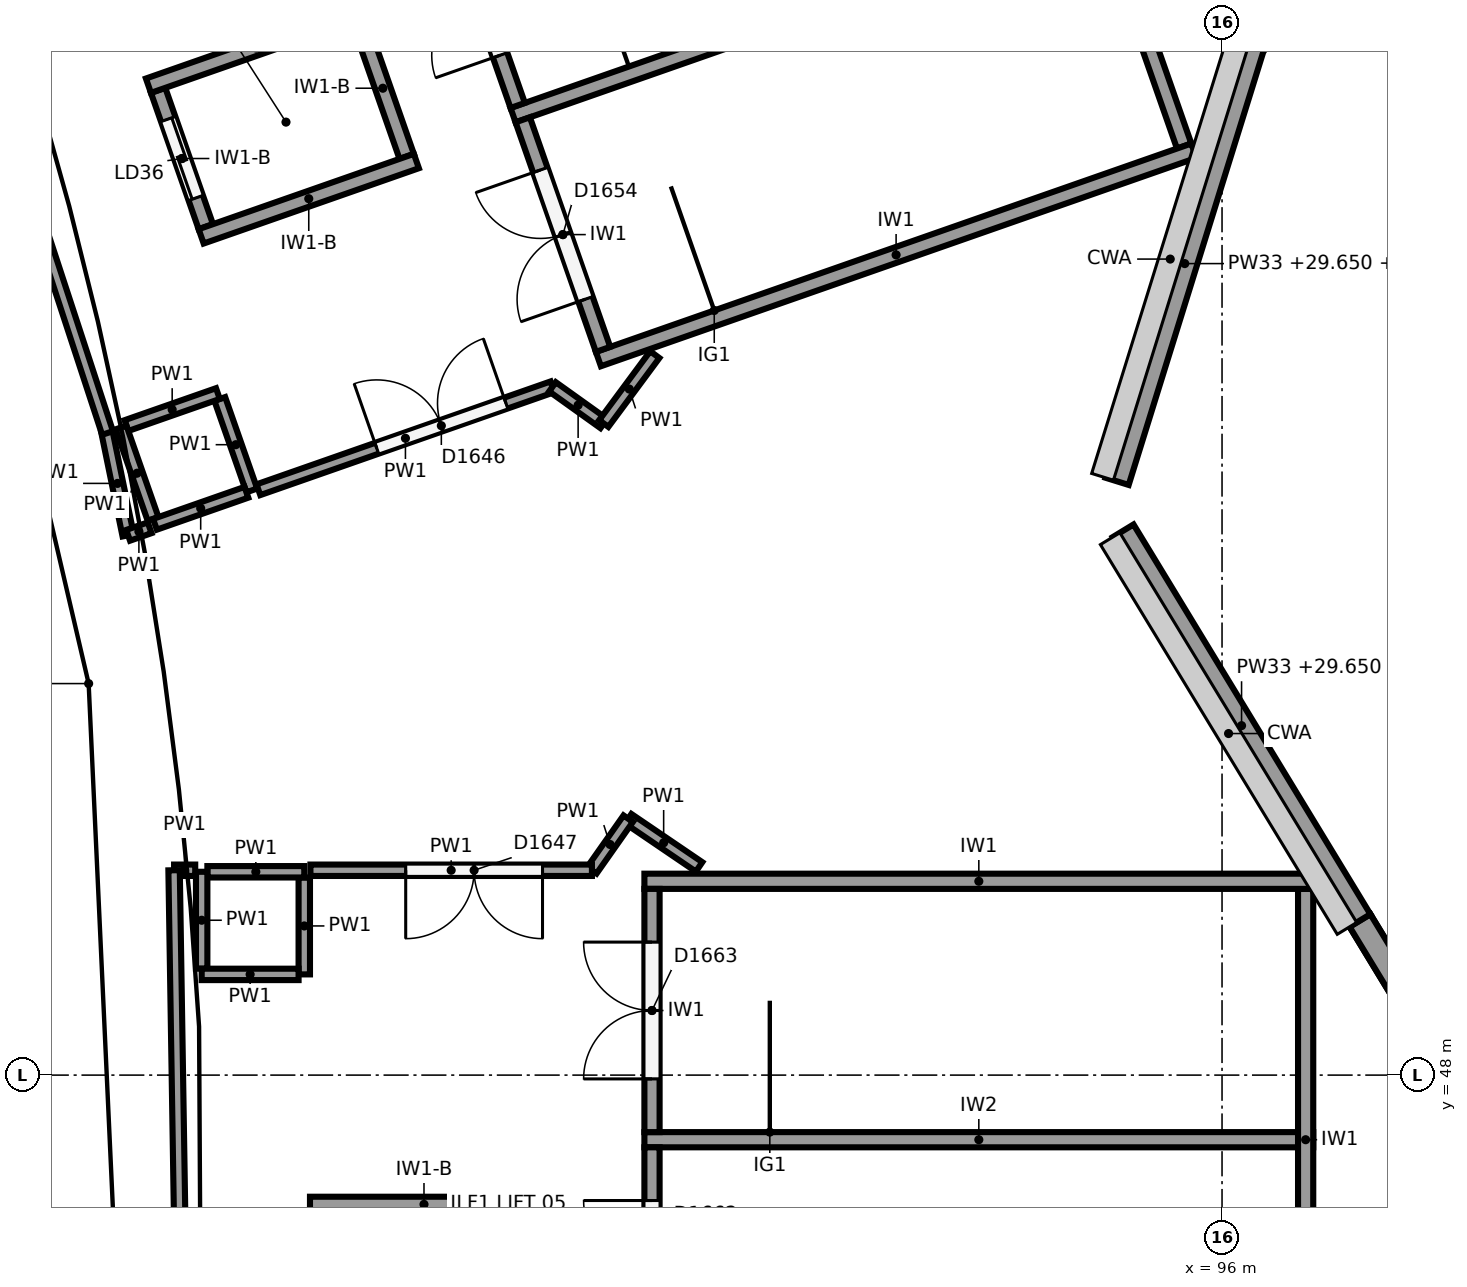
"""IFC4 building model, lengths in metres.
Left out: names, types, materials, properties, quantities, classifications, styles, units other than length and angle.
Written with IfcOpenShell. Run it as: python <this file> out.ifc"""

import sys

from ifc_helpers import new_model, si_unit, direction, frame, frame_2d, origin, origin_2d, place, context, subcontext, project, spatial, polyline, rectangle, circle, outline, extrude, element, fill, save


model = new_model("IFC4")
c1 = context("Model", 3, precision=1e-05, world=origin(), true_north=direction((0.0, 1.0)))
c2 = subcontext(c1, "Body", "Model", "MODEL_VIEW")
j1 = project(units=[si_unit("LENGTHUNIT", "METRE"), si_unit("PLANEANGLEUNIT", "RADIAN")], contexts=[c1])
p1 = place(None, origin())
s1 = spatial("IfcSite", under=j1, at=p1, CompositionType="ELEMENT")
p2 = place(p1, origin())
s2 = spatial("IfcBuilding", under=s1, at=p2, CompositionType="ELEMENT")
p3 = place(p2, frame((0.0, 0.0, 24.0)))
s3 = spatial("IfcBuildingStorey", under=s2, at=p3, CompositionType="ELEMENT", Elevation=24.0)
p4 = place(p3, frame((84.325, 53.802, 0.0), z_axis=(0.0, 0.0, 1.0), x_axis=(1.0, 0.0, 0.0)))
e1 = element("IfcColumn", 1, at=p4, inside=s3, PredefinedType="COLUMN", context=c2, shape_type="SweptSolid", body=[
    extrude(circle(Radius=0.5, at=origin_2d()), origin(), (0.0, 0.0, 1.0), 6.0),
])
p5 = place(p3, frame((94.294, 55.441, 0.0), z_axis=(0.0, 0.0, 1.0), x_axis=(1.0, 0.0, 0.0)))
e2 = element("IfcColumn", 2, at=p5, inside=s3, PredefinedType="COLUMN", context=c2, shape_type="SweptSolid", body=[
    extrude(circle(Radius=0.45, at=origin_2d()), origin(), (0.0, 0.0, 1.0), 6.0),
])
p6 = place(p3, frame((97.815, 50.034, 0.0), z_axis=(0.0, 0.0, 1.0), x_axis=(0.519367009964, -0.854551291007, 0.0)))
e3 = element("IfcWall", 3, at=p6, inside=s3, PredefinedType="SOLIDWALL", context=c2, shape_type="SweptSolid", body=[
    extrude(rectangle(XDim=6.732, YDim=0.32, at=frame_2d((3.366, 0.0))), origin(), (0.0, 0.0, 1.0), 6.0),
])
p7 = place(p6, frame((5.25, 0.0, 1.0)))
e4 = element("IfcOpeningElement", 4, at=p7, cuts=e3, PredefinedType="OPENING", context=c2, shape_type="SweptSolid", body=[
    extrude(rectangle(XDim=0.9, YDim=3.25, at=frame_2d((0.45, 1.625))), frame((0.0, 0.17, 0.0), z_axis=(0.0, -1.0, 0.0), x_axis=(1.0, 0.0, 0.0)), (0.0, 0.0, 1.0), 0.34),
])
p8 = place(p3, frame((97.815, 50.034, 6.0), z_axis=(0.0, 0.0, 1.0), x_axis=(0.519367009964, -0.854551291007, 0.0)))
e5 = element("IfcWall", 5, at=p8, inside=s3, PredefinedType="SOLIDWALL", context=c2, shape_type="SweptSolid", body=[
    extrude(outline(polyline([(0.0, 0.0), (6.732, 0.0), (6.732, 10.442), (0.0, 7.095), (0.0, 0.0)])), frame((0.0, 0.16, 0.0), z_axis=(0.0, -1.0, 0.0), x_axis=(1.0, 0.0, 0.0)), (0.0, 0.0, 1.0), 0.32),
])
p9 = place(p8, frame((5.25, 0.0, 1.6)))
e6 = element("IfcOpeningElement", 6, at=p9, cuts=e5, PredefinedType="OPENING", context=c2, shape_type="SweptSolid", body=[
    extrude(rectangle(XDim=0.9, YDim=3.0, at=frame_2d((0.45, 1.5))), frame((0.0, 0.17, 0.0), z_axis=(0.0, -1.0, 0.0), x_axis=(1.0, 0.0, 0.0)), (0.0, 0.0, 1.0), 0.34),
])
p10 = place(p3, frame((94.699, 55.161, 5.65), z_axis=(0.0, 0.0, 1.0), x_axis=(0.519376262918, -0.85454566731, 0.0)))
e7 = element("IfcWall", 7, at=p10, inside=s3, PredefinedType="SOLIDWALL", context=c2, shape_type="SweptSolid", body=[
    extrude(outline(polyline([(0.0, 0.0), (6.0, 0.0), (6.0, 7.446), (0.0, 4.463), (0.0, 0.0)])), frame((0.0, 0.16, 0.0), z_axis=(0.0, -1.0, 0.0), x_axis=(1.0, 0.0, 0.0)), (0.0, 0.0, 1.0), 0.32),
])
p11 = place(p3, frame((96.4, 61.541, 5.65), z_axis=(0.0, 0.0, 1.0), x_axis=(-0.29687527919, -0.954916262615, 0.0)))
e8 = element("IfcWall", 8, at=p11, inside=s3, PredefinedType="SOLIDWALL", context=c2, shape_type="SweptSolid", body=[
    extrude(outline(polyline([(0.0, 0.0), (6.0, 0.0), (6.0, 4.467), (0.0, 7.498), (0.0, 0.0)])), frame((0.0, 0.16, 0.0), z_axis=(0.0, -1.0, 0.0), x_axis=(1.0, 0.0, 0.0)), (0.0, 0.0, 1.0), 0.32),
])
p12 = place(p3, frame((97.2, 50.55, 0.0), z_axis=(0.0, 0.0, 1.0), x_axis=(-1.0, 0.0, 0.0)))
e9 = element("IfcWall", 9, at=p12, inside=s3, PredefinedType="SHEAR", context=c2, shape_type="SweptSolid", body=[
    extrude(rectangle(XDim=8.8, YDim=0.2, at=frame_2d((4.4, 0.0))), origin(), (0.0, 0.0, 1.0), 5.75),
])
p13 = place(p3, frame((97.1, 43.85, 0.0), z_axis=(0.0, 0.0, 1.0), x_axis=(0.0, 1.0, 0.0)))
e10 = element("IfcWall", 10, at=p13, inside=s3, PredefinedType="SHEAR", context=c2, shape_type="SweptSolid", body=[
    extrude(rectangle(XDim=6.6, YDim=0.2, at=frame_2d((3.3, 0.0))), origin(), (0.0, 0.0, 1.0), 5.75),
])
p14 = place(p3, frame((97.2, 47.15, 0.0), z_axis=(0.0, 0.0, 1.0), x_axis=(-1.0, 0.0, 0.0)))
e11 = element("IfcWall", 11, at=p14, inside=s3, PredefinedType="SHEAR", context=c2, shape_type="SweptSolid", body=[
    extrude(rectangle(XDim=8.8, YDim=0.2, at=frame_2d((4.4, 0.0))), origin(), (0.0, 0.0, 1.0), 5.75),
])
p15 = place(p3, frame((88.5, 43.85, 0.0), z_axis=(0.0, 0.0, 1.0), x_axis=(0.0, 1.0, 0.0)))
e12 = element("IfcWall", 12, at=p15, inside=s3, PredefinedType="SHEAR", context=c2, shape_type="SweptSolid", body=[
    extrude(rectangle(XDim=3.2, YDim=0.2, at=frame_2d((1.6, 0.0))), origin(), (0.0, 0.0, 1.0), 5.75),
])
p16 = place(p15, frame((0.7, 0.0, 0.0)))
e13 = element("IfcOpeningElement", 13, at=p16, cuts=e12, PredefinedType="OPENING", context=c2, shape_type="SweptSolid", body=[
    extrude(rectangle(XDim=1.8, YDim=2.1, at=frame_2d((0.9, 1.05))), frame((0.0, 0.11, 0.0), z_axis=(0.0, -1.0, 0.0), x_axis=(1.0, 0.0, 0.0)), (0.0, 0.0, 1.0), 0.22),
])
p17 = place(p3, frame((88.5, 47.25, 0.0), z_axis=(0.0, 0.0, 1.0), x_axis=(0.0, 1.0, 0.0)))
e14 = element("IfcWall", 14, at=p17, inside=s3, PredefinedType="SHEAR", context=c2, shape_type="SweptSolid", body=[
    extrude(rectangle(XDim=3.2, YDim=0.2, at=frame_2d((1.6, 0.0))), origin(), (0.0, 0.0, 1.0), 5.75),
])
p18 = place(p17, frame((0.7, 0.0, 0.0)))
e15 = element("IfcOpeningElement", 15, at=p18, cuts=e14, PredefinedType="OPENING", context=c2, shape_type="SweptSolid", body=[
    extrude(rectangle(XDim=1.8, YDim=2.1, at=frame_2d((0.9, 1.05))), frame((0.0, 0.11, 0.0), z_axis=(0.0, -1.0, 0.0), x_axis=(1.0, 0.0, 0.0)), (0.0, 0.0, 1.0), 0.22),
])
p19 = place(p3, frame((87.0, 46.3, 0.0), z_axis=(0.0, 0.0, 1.0), x_axis=(-1.0, 0.0, 0.0)))
e16 = element("IfcWall", 16, at=p19, inside=s3, PredefinedType="SHEAR", context=c2, shape_type="SweptSolid", body=[
    extrude(rectangle(XDim=3.0, YDim=0.2, at=frame_2d((1.5, 0.0))), origin(), (0.0, 0.0, 1.0), 4.6),
])
p20 = place(p3, frame((95.629, 60.162, 0.0), z_axis=(0.0, 0.0, 1.0), x_axis=(-0.943887243331, -0.330267878966, 0.0)))
e17 = element("IfcWall", 17, at=p20, inside=s3, PredefinedType="SHEAR", context=c2, shape_type="SweptSolid", body=[
    extrude(rectangle(XDim=8.3, YDim=0.2, at=frame_2d((4.15, 0.0))), origin(), (0.0, 0.0, 1.0), 5.75),
])
p21 = place(p3, frame((95.501, 60.223, 0.0), z_axis=(0.0, 0.0, 1.0), x_axis=(-0.330286164688, 0.943880844925, 0.0)))
e18 = element("IfcWall", 18, at=p21, inside=s3, PredefinedType="SHEAR", context=c2, shape_type="SweptSolid", body=[
    extrude(rectangle(XDim=6.6, YDim=0.2, at=frame_2d((3.3, 0.0))), origin(), (0.0, 0.0, 1.0), 5.75),
])
p22 = place(p3, frame((94.506, 63.371, 0.0), z_axis=(0.0, 0.0, 1.0), x_axis=(-0.943878073457, -0.330294084791, 0.0)))
e19 = element("IfcWall", 19, at=p22, inside=s3, PredefinedType="SHEAR", context=c2, shape_type="SweptSolid", body=[
    extrude(rectangle(XDim=8.3, YDim=0.2, at=frame_2d((4.15, 0.0))), origin(), (0.0, 0.0, 1.0), 5.75),
])
p23 = place(p3, frame((87.856, 57.548, 0.0), z_axis=(0.0, 0.0, 1.0), x_axis=(-0.330268863922, 0.943886898693, 0.0)))
e20 = element("IfcWall", 20, at=p23, inside=s3, PredefinedType="SHEAR", context=c2, shape_type="SweptSolid", body=[
    extrude(rectangle(XDim=3.2, YDim=0.2, at=frame_2d((1.6, 0.0))), origin(), (0.0, 0.0, 1.0), 5.75),
])
p24 = place(p23, frame((0.7, 0.0, 0.0)))
e21 = element("IfcOpeningElement", 21, at=p24, cuts=e20, PredefinedType="OPENING", context=c2, shape_type="SweptSolid", body=[
    extrude(rectangle(XDim=1.8, YDim=2.1, at=frame_2d((0.9, 1.05))), frame((0.0, 0.11, 0.0), z_axis=(0.0, -1.0, 0.0), x_axis=(1.0, 0.0, 0.0)), (0.0, 0.0, 1.0), 0.22),
])
p25 = place(p3, frame((86.733, 60.757, 0.0), z_axis=(0.0, 0.0, 1.0), x_axis=(-0.330268863922, 0.943886898693, 0.0)))
e22 = element("IfcWall", 22, at=p25, inside=s3, PredefinedType="SHEAR", context=c2, shape_type="SweptSolid", body=[
    extrude(rectangle(XDim=3.2, YDim=0.2, at=frame_2d((1.6, 0.0))), origin(), (0.0, 0.0, 1.0), 5.75),
])
p26 = place(p25, frame((0.7, 0.0, 0.0)))
e23 = element("IfcOpeningElement", 23, at=p26, cuts=e22, PredefinedType="OPENING", context=c2, shape_type="SweptSolid", body=[
    extrude(rectangle(XDim=1.8, YDim=2.1, at=frame_2d((0.9, 1.05))), frame((0.0, 0.11, 0.0), z_axis=(0.0, -1.0, 0.0), x_axis=(1.0, 0.0, 0.0)), (0.0, 0.0, 1.0), 0.22),
])
p27 = place(p3, frame((85.4, 60.025, 0.0), z_axis=(0.0, 0.0, 1.0), x_axis=(-0.943900215722, -0.330230802259, 0.0)))
e24 = element("IfcWall", 24, at=p27, inside=s3, PredefinedType="SHEAR", context=c2, shape_type="SweptSolid", body=[
    extrude(rectangle(XDim=3.0, YDim=0.2, at=frame_2d((1.5, 0.0))), origin(), (0.0, 0.0, 1.0), 4.6),
])
p28 = place(p3, frame((84.706, 62.008, 0.0), z_axis=(0.0, 0.0, 1.0), x_axis=(-0.943874847782, -0.330303302625, 0.0)))
e25 = element("IfcWall", 25, at=p28, inside=s3, PredefinedType="SHEAR", context=c2, shape_type="SweptSolid", body=[
    extrude(rectangle(XDim=3.0, YDim=0.2, at=frame_2d((1.5, 0.0))), origin(), (0.0, 0.0, 1.0), 4.6),
])
p29 = place(p3, frame((85.272, 60.087, 0.0), z_axis=(0.0, 0.0, 1.0), x_axis=(-0.330224505327, 0.943902418729, 0.0)))
e26 = element("IfcWall", 26, at=p29, inside=s3, PredefinedType="SHEAR", context=c2, shape_type="SweptSolid", body=[
    extrude(rectangle(XDim=1.9, YDim=0.2, at=frame_2d((0.95, 0.0))), origin(), (0.0, 0.0, 1.0), 4.6),
])
p30 = place(p3, frame((82.629, 59.162, 0.0), z_axis=(0.0, 0.0, 1.0), x_axis=(-0.330224505327, 0.943902418729, 0.0)))
e27 = element("IfcWall", 27, at=p30, inside=s3, PredefinedType="SHEAR", context=c2, shape_type="SweptSolid", body=[
    extrude(rectangle(XDim=1.9, YDim=0.2, at=frame_2d((0.95, 0.0))), origin(), (0.0, 0.0, 1.0), 4.6),
])
p31 = place(p30, frame((0.4, 0.0, 0.0)))
e28 = element("IfcOpeningElement", 28, at=p31, cuts=e27, PredefinedType="OPENING", context=c2, shape_type="SweptSolid", body=[
    extrude(rectangle(XDim=1.1, YDim=2.1, at=frame_2d((0.55, 1.05))), frame((0.0, 0.11, 0.0), z_axis=(0.0, -1.0, 0.0), x_axis=(1.0, 0.0, 0.0)), (0.0, 0.0, 1.0), 0.22),
])
for number, where, z_axis, x_axis in (
    (29, (83.925, 49.325, 0.0), (0.0, 0.0, 1.0), (0.0, 1.0, 0.0)),
    (30, (83.925, 50.675, 0.0), (0.0, 0.0, 1.0), (-1.0, 0.0, 0.0)),
    (31, (82.575, 50.675, 0.0), (0.0, 0.0, 1.0), (0.0, -1.0, 0.0)),
    (32, (82.575, 49.325, 0.0), (0.0, 0.0, 1.0), (1.0, 0.0, 0.0)),
):
    element("IfcWall", number, at=place(p3, frame(where, z_axis=z_axis, x_axis=x_axis)), inside=s3, PredefinedType="PARTITIONING", context=c2, shape_type="SweptSolid", body=[
        extrude(rectangle(XDim=1.275, YDim=0.15, at=frame_2d((0.638, 0.0))), origin(), (0.0, 0.0, 1.0), 5.4),
    ])
p32 = place(p3, frame((89.12, 50.74, 0.0), z_axis=(0.0, 0.0, 1.0), x_axis=(-0.827055308354, 0.562120553728, 0.0)))
e33 = element("IfcWall", 33, at=p32, inside=s3, PredefinedType="PARTITIONING", context=c2, shape_type="SweptSolid", body=[
    extrude(rectangle(XDim=1.128, YDim=0.15, at=frame_2d((0.564, 0.0))), origin(), (0.0, 0.0, 1.0), 5.4),
])
p33 = place(p3, frame((88.187, 51.374, 0.0), z_axis=(0.0, 0.0, 1.0), x_axis=(-0.575376756214, -0.817888493872, 0.0)))
e34 = element("IfcWall", 34, at=p33, inside=s3, PredefinedType="PARTITIONING", context=c2, shape_type="SweptSolid", body=[
    extrude(rectangle(XDim=0.83, YDim=0.15, at=frame_2d((0.415, 0.0))), origin(), (0.0, 0.0, 1.0), 5.4),
])
p34 = place(p3, frame((87.709, 50.695, 0.0), z_axis=(0.0, 0.0, 1.0), x_axis=(-1.0, 0.0, 0.0)))
e35 = element("IfcWall", 35, at=p34, inside=s3, PredefinedType="PARTITIONING", context=c2, shape_type="SweptSolid", body=[
    extrude(rectangle(XDim=3.704, YDim=0.15, at=frame_2d((1.852, 0.0))), origin(), (0.0, 0.0, 1.0), 5.4),
])
p35 = place(p34, frame((0.65, 0.0, 0.0)))
e36 = element("IfcOpeningElement", 36, at=p35, cuts=e35, PredefinedType="OPENING", context=c2, shape_type="SweptSolid", body=[
    extrude(rectangle(XDim=1.8, YDim=2.1, at=frame_2d((0.9, 1.05))), frame((0.0, 0.085, 0.0), z_axis=(0.0, -1.0, 0.0), x_axis=(1.0, 0.0, 0.0)), (0.0, 0.0, 1.0), 0.17),
])
p36 = place(p3, frame((82.49, 50.695, 0.0), z_axis=(0.0, 0.0, 1.0), x_axis=(-1.0, 0.0, 0.0)))
e37 = element("IfcWall", 37, at=p36, inside=s3, PredefinedType="PARTITIONING", context=c2, shape_type="SweptSolid", body=[
    extrude(rectangle(XDim=0.278, YDim=0.15, at=frame_2d((0.139, 0.0))), origin(), (0.0, 0.0, 1.0), 5.4),
])
p37 = place(p3, frame((82.212, 50.695, 0.0), z_axis=(0.0, 0.0, 1.0), x_axis=(0.01602775075, -0.999871547353, 0.0)))
e38 = element("IfcWall", 38, at=p37, inside=s3, PredefinedType="PARTITIONING", context=c2, shape_type="SweptSolid", body=[
    extrude(rectangle(XDim=13.892, YDim=0.15, at=frame_2d((6.946, 0.0))), origin(), (0.0, 0.0, 1.0), 5.4),
])
for number, where, z_axis, x_axis in (
    (39, (83.235, 55.692, 0.0), (0.0, 0.0, 1.0), (-0.33, 0.944, 0.0)),
    (40, (82.789, 56.966, 0.0), (0.0, 0.0, 1.0), (-0.944, -0.33, 0.0)),
    (41, (81.514, 56.521, 0.0), (0.0, 0.0, 1.0), (0.33, -0.944, 0.0)),
):
    element("IfcWall", number, at=place(p3, frame(where, z_axis=z_axis, x_axis=x_axis)), inside=s3, PredefinedType="PARTITIONING", context=c2, shape_type="SweptSolid", body=[
        extrude(rectangle(XDim=1.275, YDim=0.15, at=frame_2d((0.637, 0.0))), origin(), (0.0, 0.0, 1.0), 5.4),
    ])
p38 = place(p3, frame((81.96, 55.246, 0.0), z_axis=(0.0, 0.0, 1.0), x_axis=(0.943888201207, 0.330265141396, 0.0)))
e42 = element("IfcWall", 42, at=p38, inside=s3, PredefinedType="PARTITIONING", context=c2, shape_type="SweptSolid", body=[
    extrude(rectangle(XDim=1.275, YDim=0.15, at=frame_2d((0.638, 0.0))), origin(), (0.0, 0.0, 1.0), 5.4),
])
p39 = place(p3, frame((81.327, 56.468, 0.0), z_axis=(0.0, 0.0, 1.0), x_axis=(0.200862273188, -0.979619491032, 0.0)))
e43 = element("IfcWall", 43, at=p39, inside=s3, PredefinedType="PARTITIONING", context=c2, shape_type="SweptSolid", body=[
    extrude(rectangle(XDim=1.394, YDim=0.15, at=frame_2d((0.697, 0.0))), origin(), (0.0, 0.0, 1.0), 5.4),
])
p40 = place(p3, frame((81.607, 55.102, 0.0), z_axis=(0.0, 0.0, 1.0), x_axis=(0.944111851886, 0.329625258633, 0.0)))
e44 = element("IfcWall", 44, at=p40, inside=s3, PredefinedType="PARTITIONING", context=c2, shape_type="SweptSolid", body=[
    extrude(rectangle(XDim=0.3, YDim=0.15, at=frame_2d((0.15, 0.0))), origin(), (0.0, 0.0, 1.0), 5.4),
])
p41 = place(p3, frame((83.321, 55.701, 0.0), z_axis=(0.0, 0.0, 1.0), x_axis=(0.943873211719, 0.330307977801, 0.0)))
e45 = element("IfcWall", 45, at=p41, inside=s3, PredefinedType="PARTITIONING", context=c2, shape_type="SweptSolid", body=[
    extrude(rectangle(XDim=4.099, YDim=0.15, at=frame_2d((2.05, 0.0))), origin(), (0.0, 0.0, 1.0), 5.4),
])
p42 = place(p41, frame((1.65, 0.0, 0.0)))
e46 = element("IfcOpeningElement", 46, at=p42, cuts=e45, PredefinedType="OPENING", context=c2, shape_type="SweptSolid", body=[
    extrude(rectangle(XDim=1.8, YDim=2.1, at=frame_2d((0.9, 1.05))), frame((0.0, 0.085, 0.0), z_axis=(0.0, -1.0, 0.0), x_axis=(1.0, 0.0, 0.0)), (0.0, 0.0, 1.0), 0.17),
])
p43 = place(p3, frame((87.19, 57.055, 0.0), z_axis=(0.0, 0.0, 1.0), x_axis=(0.813315890962, -0.581822362504, 0.0)))
e47 = element("IfcWall", 47, at=p43, inside=s3, PredefinedType="PARTITIONING", context=c2, shape_type="SweptSolid", body=[
    extrude(rectangle(XDim=0.83, YDim=0.15, at=frame_2d((0.415, 0.0))), origin(), (0.0, 0.0, 1.0), 5.4),
])
p44 = place(p3, frame((87.865, 56.573, 0.0), z_axis=(0.0, 0.0, 1.0), x_axis=(0.595036002288, 0.803699045651, 0.0)))
e48 = element("IfcWall", 48, at=p44, inside=s3, PredefinedType="PARTITIONING", context=c2, shape_type="SweptSolid", body=[
    extrude(rectangle(XDim=1.128, YDim=0.15, at=frame_2d((0.564, 0.0))), origin(), (0.0, 0.0, 1.0), 5.4),
])
p45 = place(p3, frame((77.435, 68.357, 0.0), z_axis=(0.0, 0.0, 1.0), x_axis=(0.311320262687, -0.950305053149, 0.0)))
e49 = element("IfcWall", 49, at=p45, inside=s3, PredefinedType="PARTITIONING", context=c2, shape_type="SweptSolid", body=[
    extrude(rectangle(XDim=12.532, YDim=0.15, at=frame_2d((6.266, 0.0))), origin(), (0.0, 0.0, 1.0), 5.4),
])
p46 = place(p16, origin())
e50 = element("IfcDoor", 50, at=p46, inside=s3, OperationType="DOUBLE_DOOR_SINGLE_SWING", PredefinedType="DOOR", context=c2, shape_type="SweptSolid", body=[
    extrude(rectangle(XDim=1.8, YDim=2.1, at=frame_2d((0.9, 1.05))), frame((0.0, 0.025, 0.0), z_axis=(0.0, -1.0, 0.0), x_axis=(1.0, 0.0, 0.0)), (0.0, 0.0, 1.0), 0.05),
])
fill(e13, e50)
p47 = place(p18, origin())
e51 = element("IfcDoor", 51, at=p47, inside=s3, OperationType="DOUBLE_DOOR_SINGLE_SWING", PredefinedType="DOOR", context=c2, shape_type="SweptSolid", body=[
    extrude(rectangle(XDim=1.8, YDim=2.1, at=frame_2d((0.9, 1.05))), frame((0.0, 0.025, 0.0), z_axis=(0.0, -1.0, 0.0), x_axis=(1.0, 0.0, 0.0)), (0.0, 0.0, 1.0), 0.05),
])
fill(e15, e51)
p48 = place(p24, origin())
e52 = element("IfcDoor", 52, at=p48, inside=s3, OperationType="DOUBLE_DOOR_SINGLE_SWING", PredefinedType="DOOR", context=c2, shape_type="SweptSolid", body=[
    extrude(rectangle(XDim=1.8, YDim=2.1, at=frame_2d((0.9, 1.05))), frame((0.0, 0.025, 0.0), z_axis=(0.0, -1.0, 0.0), x_axis=(1.0, 0.0, 0.0)), (0.0, 0.0, 1.0), 0.05),
])
fill(e21, e52)
p49 = place(p26, origin())
e53 = element("IfcDoor", 53, at=p49, inside=s3, OperationType="DOUBLE_DOOR_SINGLE_SWING", PredefinedType="DOOR", context=c2, shape_type="SweptSolid", body=[
    extrude(rectangle(XDim=1.8, YDim=2.1, at=frame_2d((0.9, 1.05))), frame((0.0, 0.025, 0.0), z_axis=(0.0, -1.0, 0.0), x_axis=(1.0, 0.0, 0.0)), (0.0, 0.0, 1.0), 0.05),
])
fill(e23, e53)
p50 = place(p31, origin())
e54 = element("IfcDoor", 54, at=p50, inside=s3, OperationType="SLIDING_TO_RIGHT", PredefinedType="DOOR", context=c2, shape_type="SweptSolid", body=[
    extrude(rectangle(XDim=1.1, YDim=2.1, at=frame_2d((0.55, 1.05))), frame((0.0, 0.025, 0.0), z_axis=(0.0, -1.0, 0.0), x_axis=(1.0, 0.0, 0.0)), (0.0, 0.0, 1.0), 0.05),
])
fill(e28, e54)
p51 = place(p35, origin())
e55 = element("IfcDoor", 55, at=p51, inside=s3, OperationType="DOUBLE_DOOR_SINGLE_SWING", PredefinedType="DOOR", context=c2, shape_type="SweptSolid", body=[
    extrude(rectangle(XDim=1.8, YDim=2.1, at=frame_2d((0.9, 1.05))), frame((0.0, 0.025, 0.0), z_axis=(0.0, -1.0, 0.0), x_axis=(1.0, 0.0, 0.0)), (0.0, 0.0, 1.0), 0.05),
])
fill(e36, e55)
p52 = place(p42, origin())
e56 = element("IfcDoor", 56, at=p52, inside=s3, OperationType="DOUBLE_DOOR_SINGLE_SWING", PredefinedType="DOOR", context=c2, shape_type="SweptSolid", body=[
    extrude(rectangle(XDim=1.8, YDim=2.1, at=frame_2d((0.9, 1.05))), frame((0.0, 0.025, 0.0), z_axis=(0.0, -1.0, 0.0), x_axis=(1.0, 0.0, 0.0)), (0.0, 0.0, 1.0), 0.05),
])
fill(e46, e56)
save(model, sys.argv[1])
